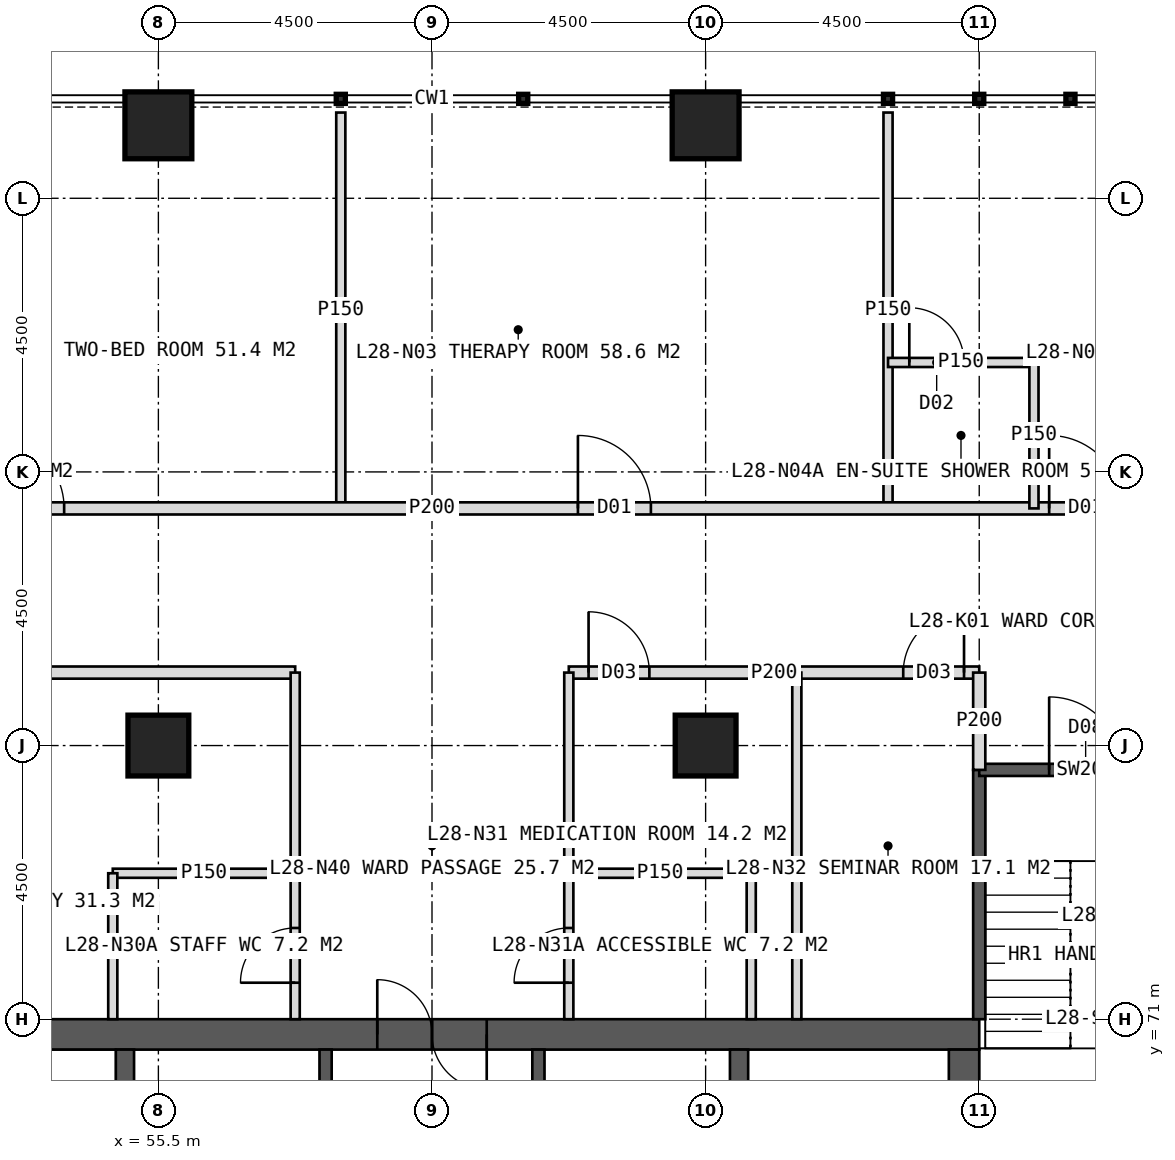
"""IFC4 building model, lengths in metres.
Left out: names, types, materials, properties, quantities, classifications, styles, units other than length and angle.
Written with IfcOpenShell. Run it as: python <this file> out.ifc"""

import sys

from ifc_helpers import new_model, si_unit, direction, frame, frame_2d, origin, origin_2d, place, context, subcontext, project, spatial, rectangle, hollow_rectangle, extrude, element, fill, save


model = new_model("IFC4")
c1 = context("Model", 3, precision=1e-05, world=origin(), true_north=direction((0.0, 1.0)))
c2 = subcontext(c1, "Body", "Model", "MODEL_VIEW")
j1 = project(units=[si_unit("LENGTHUNIT", "METRE"), si_unit("PLANEANGLEUNIT", "RADIAN")], contexts=[c1])
p1 = place(None, origin())
s1 = spatial("IfcSite", under=j1, at=p1, CompositionType="ELEMENT")
p2 = place(p1, origin())
s2 = spatial("IfcBuilding", under=s1, at=p2, CompositionType="ELEMENT")
p3 = place(p2, frame((0.0, 0.0, 120.0)))
s3 = spatial("IfcBuildingStorey", under=s2, at=p3, CompositionType="ELEMENT", Elevation=120.0)
p4 = place(p3, frame((51.0, 70.75, 0.0), z_axis=(0.0, 0.0, 1.0), x_axis=(1.0, 0.0, 0.0)))
e1 = element("IfcWall", 1, at=p4, inside=s3, PredefinedType="SHEAR", context=c2, shape_type="SweptSolid", body=[
    extrude(rectangle(XDim=18.0, YDim=0.5, at=frame_2d((9.0, 0.0))), origin(), (0.0, 0.0, 1.0), 4.0),
])
p5 = place(p4, frame((8.1, 0.0, 0.0)))
e2 = element("IfcOpeningElement", 2, at=p5, cuts=e1, PredefinedType="OPENING", context=c2, shape_type="SweptSolid", body=[
    extrude(rectangle(XDim=1.8, YDim=2.2, at=frame_2d((0.9, 1.1))), frame((0.0, 0.26, 0.0), z_axis=(0.0, -1.0, 0.0), x_axis=(1.0, 0.0, 0.0)), (0.0, 0.0, 1.0), 0.52),
])
p6 = place(p3, frame((68.75, 53.5, 0.0), z_axis=(0.0, 0.0, 1.0), x_axis=(0.0, 1.0, 0.0)))
e3 = element("IfcWall", 3, at=p6, inside=s3, PredefinedType="SHEAR", context=c2, shape_type="SweptSolid", body=[
    extrude(rectangle(XDim=17.0, YDim=0.5, at=frame_2d((8.5, 0.0))), origin(), (0.0, 0.0, 1.0), 4.0),
])
p7 = place(p6, frame((9.5, 0.0, 0.0)))
e4 = element("IfcOpeningElement", 4, at=p7, cuts=e3, PredefinedType="OPENING", context=c2, shape_type="SweptSolid", body=[
    extrude(rectangle(XDim=1.5, YDim=2.2, at=frame_2d((0.75, 1.1))), frame((0.0, 0.26, 0.0), z_axis=(0.0, -1.0, 0.0), x_axis=(1.0, 0.0, 0.0)), (0.0, 0.0, 1.0), 0.52),
])
for number, where, z_axis, x_axis in (
    (5, (54.95, 53.5, 0.0), (0.0, 0.0, 1.0), (0.0, 1.0, 0.0)),
    (6, (65.05, 53.5, 0.0), (0.0, 0.0, 1.0), (0.0, 1.0, 0.0)),
):
    element("IfcWall", number, at=place(p3, frame(where, z_axis=z_axis, x_axis=x_axis)), inside=s3, PredefinedType="SHEAR", context=c2, shape_type="SweptSolid", body=[
        extrude(rectangle(XDim=17.0, YDim=0.3, at=frame_2d((8.5, 0.0))), origin(), (0.0, 0.0, 1.0), 4.0),
    ])
p8 = place(p3, frame((58.25, 53.5, 0.0), z_axis=(0.0, 0.0, 1.0), x_axis=(0.0, 1.0, 0.0)))
e7 = element("IfcWall", 7, at=p8, inside=s3, PredefinedType="SHEAR", context=c2, shape_type="SweptSolid", body=[
    extrude(rectangle(XDim=17.0, YDim=0.2, at=frame_2d((8.5, 0.0))), origin(), (0.0, 0.0, 1.0), 4.0),
])
p9 = place(p8, frame((1.375, 0.0, 0.0)))
e8 = element("IfcOpeningElement", 8, at=p9, cuts=e7, PredefinedType="OPENING", context=c2, shape_type="SweptSolid", body=[
    extrude(rectangle(XDim=1.4, YDim=2.2, at=frame_2d((0.7, 1.1))), frame((0.0, 0.11, 0.0), z_axis=(0.0, -1.0, 0.0), x_axis=(1.0, 0.0, 0.0)), (0.0, 0.0, 1.0), 0.22),
])
p10 = place(p8, frame((5.675, 0.0, 0.0)))
e9 = element("IfcOpeningElement", 9, at=p10, cuts=e7, PredefinedType="OPENING", context=c2, shape_type="SweptSolid", body=[
    extrude(rectangle(XDim=1.4, YDim=2.2, at=frame_2d((0.7, 1.1))), frame((0.0, 0.11, 0.0), z_axis=(0.0, -1.0, 0.0), x_axis=(1.0, 0.0, 0.0)), (0.0, 0.0, 1.0), 0.22),
])
p11 = place(p3, frame((61.75, 53.5, 0.0), z_axis=(0.0, 0.0, 1.0), x_axis=(0.0, 1.0, 0.0)))
e10 = element("IfcWall", 10, at=p11, inside=s3, PredefinedType="SHEAR", context=c2, shape_type="SweptSolid", body=[
    extrude(rectangle(XDim=17.0, YDim=0.2, at=frame_2d((8.5, 0.0))), origin(), (0.0, 0.0, 1.0), 4.0),
])
p12 = place(p11, frame((1.375, 0.0, 0.0)))
e11 = element("IfcOpeningElement", 11, at=p12, cuts=e10, PredefinedType="OPENING", context=c2, shape_type="SweptSolid", body=[
    extrude(rectangle(XDim=1.4, YDim=2.2, at=frame_2d((0.7, 1.1))), frame((0.0, 0.11, 0.0), z_axis=(0.0, -1.0, 0.0), x_axis=(1.0, 0.0, 0.0)), (0.0, 0.0, 1.0), 0.22),
])
p13 = place(p11, frame((5.675, 0.0, 0.0)))
e12 = element("IfcOpeningElement", 12, at=p13, cuts=e10, PredefinedType="OPENING", context=c2, shape_type="SweptSolid", body=[
    extrude(rectangle(XDim=1.4, YDim=2.2, at=frame_2d((0.7, 1.1))), frame((0.0, 0.11, 0.0), z_axis=(0.0, -1.0, 0.0), x_axis=(1.0, 0.0, 0.0)), (0.0, 0.0, 1.0), 0.22),
])
for number, where, z_axis, x_axis in (
    (13, (55.5, 75.5, 0.0), (0.0, 0.0, 1.0), (1.0, 0.0, 0.0)),
    (14, (64.5, 75.5, 0.0), (0.0, 0.0, 1.0), (1.0, 0.0, 0.0)),
):
    element("IfcColumn", number, at=place(p3, frame(where, z_axis=z_axis, x_axis=x_axis)), inside=s3, PredefinedType="COLUMN", context=c2, shape_type="SweptSolid", body=[
        extrude(hollow_rectangle(XDim=1.0, YDim=1.0, WallThickness=0.1, at=origin_2d()), origin(), (0.0, 0.0, 1.0), 4.0),
    ])
for number, where, z_axis, x_axis in (
    (15, (55.5, 85.7, 0.0), (0.0, 0.0, 1.0), (1.0, 0.0, 0.0)),
    (16, (64.5, 85.7, 0.0), (0.0, 0.0, 1.0), (1.0, 0.0, 0.0)),
):
    element("IfcColumn", number, at=place(p3, frame(where, z_axis=z_axis, x_axis=x_axis)), inside=s3, PredefinedType="COLUMN", context=c2, shape_type="SweptSolid", body=[
        extrude(hollow_rectangle(XDim=1.1, YDim=1.1, WallThickness=0.1, at=origin_2d()), origin(), (0.0, 0.0, 1.0), 4.0),
    ])
for number, where, z_axis, x_axis in (
    (17, (58.5, 79.4, 0.0), (0.0, 0.0, 1.0), (0.0, 1.0, 0.0)),
    (18, (67.5, 79.4, 0.0), (0.0, 0.0, 1.0), (0.0, 1.0, 0.0)),
):
    element("IfcWall", number, at=place(p3, frame(where, z_axis=z_axis, x_axis=x_axis)), inside=s3, PredefinedType="PARTITIONING", context=c2, shape_type="SweptSolid", body=[
        extrude(rectangle(XDim=6.51, YDim=0.15, at=frame_2d((3.255, 0.0))), origin(), (0.0, 0.0, 1.0), 3.75),
    ])
p14 = place(p3, frame((42.6, 79.4, 0.0), z_axis=(0.0, 0.0, 1.0), x_axis=(1.0, 0.0, 0.0)))
e19 = element("IfcWall", 19, at=p14, inside=s3, PredefinedType="PARTITIONING", context=c2, shape_type="SweptSolid", body=[
    extrude(rectangle(XDim=34.8, YDim=0.2, at=frame_2d((17.4, 0.0))), origin(), (0.0, 0.0, 1.0), 3.75),
])
p15 = place(p14, frame((2.45, 0.0, 0.0)))
e20 = element("IfcOpeningElement", 20, at=p15, cuts=e19, PredefinedType="OPENING", context=c2, shape_type="SweptSolid", body=[
    extrude(rectangle(XDim=1.2, YDim=2.2, at=frame_2d((0.6, 1.1))), frame((0.0, 0.11, 0.0), z_axis=(0.0, -1.0, 0.0), x_axis=(1.0, 0.0, 0.0)), (0.0, 0.0, 1.0), 0.22),
])
p16 = place(p14, frame((10.15, 0.0, 0.0)))
e21 = element("IfcOpeningElement", 21, at=p16, cuts=e19, PredefinedType="OPENING", context=c2, shape_type="SweptSolid", body=[
    extrude(rectangle(XDim=1.2, YDim=2.2, at=frame_2d((0.6, 1.1))), frame((0.0, 0.11, 0.0), z_axis=(0.0, -1.0, 0.0), x_axis=(1.0, 0.0, 0.0)), (0.0, 0.0, 1.0), 0.22),
])
p17 = place(p14, frame((19.8, 0.0, 0.0)))
e22 = element("IfcOpeningElement", 22, at=p17, cuts=e19, PredefinedType="OPENING", context=c2, shape_type="SweptSolid", body=[
    extrude(rectangle(XDim=1.2, YDim=2.2, at=frame_2d((0.6, 1.1))), frame((0.0, 0.11, 0.0), z_axis=(0.0, -1.0, 0.0), x_axis=(1.0, 0.0, 0.0)), (0.0, 0.0, 1.0), 0.22),
])
p18 = place(p14, frame((27.55, 0.0, 0.0)))
e23 = element("IfcOpeningElement", 23, at=p18, cuts=e19, PredefinedType="OPENING", context=c2, shape_type="SweptSolid", body=[
    extrude(rectangle(XDim=1.2, YDim=2.2, at=frame_2d((0.6, 1.1))), frame((0.0, 0.11, 0.0), z_axis=(0.0, -1.0, 0.0), x_axis=(1.0, 0.0, 0.0)), (0.0, 0.0, 1.0), 0.22),
])
p19 = place(p3, frame((67.5, 81.8, 0.0), z_axis=(0.0, 0.0, 1.0), x_axis=(1.0, 0.0, 0.0)))
e24 = element("IfcWall", 24, at=p19, inside=s3, PredefinedType="PARTITIONING", context=c2, shape_type="SweptSolid", body=[
    extrude(rectangle(XDim=2.4, YDim=0.15, at=frame_2d((1.2, 0.0))), origin(), (0.0, 0.0, 1.0), 3.75),
])
p20 = place(p19, frame((0.35, 0.0, 0.0)))
e25 = element("IfcOpeningElement", 25, at=p20, cuts=e24, PredefinedType="OPENING", context=c2, shape_type="SweptSolid", body=[
    extrude(rectangle(XDim=0.9, YDim=2.1, at=frame_2d((0.45, 1.05))), frame((0.0, 0.085, 0.0), z_axis=(0.0, -1.0, 0.0), x_axis=(1.0, 0.0, 0.0)), (0.0, 0.0, 1.0), 0.17),
])
p21 = place(p3, frame((69.9, 79.4, 0.0), z_axis=(0.0, 0.0, 1.0), x_axis=(0.0, 1.0, 0.0)))
e26 = element("IfcWall", 26, at=p21, inside=s3, PredefinedType="PARTITIONING", context=c2, shape_type="SweptSolid", body=[
    extrude(rectangle(XDim=2.4, YDim=0.15, at=frame_2d((1.2, 0.0))), origin(), (0.0, 0.0, 1.0), 3.75),
])
p22 = place(p3, frame((45.3, 76.7, 0.0), z_axis=(0.0, 0.0, 1.0), x_axis=(1.0, 0.0, 0.0)))
e27 = element("IfcWall", 27, at=p22, inside=s3, PredefinedType="PARTITIONING", context=c2, shape_type="SweptSolid", body=[
    extrude(rectangle(XDim=12.45, YDim=0.2, at=frame_2d((6.225, 0.0))), origin(), (0.0, 0.0, 1.0), 3.75),
])
p23 = place(p22, frame((7.15, 0.0, 0.0)))
e28 = element("IfcOpeningElement", 28, at=p23, cuts=e27, PredefinedType="OPENING", context=c2, shape_type="SweptSolid", body=[
    extrude(rectangle(XDim=1.0, YDim=2.1, at=frame_2d((0.5, 1.05))), frame((0.0, 0.11, 0.0), z_axis=(0.0, -1.0, 0.0), x_axis=(1.0, 0.0, 0.0)), (0.0, 0.0, 1.0), 0.22),
])
p24 = place(p3, frame((62.25, 76.7, 0.0), z_axis=(0.0, 0.0, 1.0), x_axis=(1.0, 0.0, 0.0)))
e29 = element("IfcWall", 29, at=p24, inside=s3, PredefinedType="PARTITIONING", context=c2, shape_type="SweptSolid", body=[
    extrude(rectangle(XDim=6.75, YDim=0.2, at=frame_2d((3.375, 0.0))), origin(), (0.0, 0.0, 1.0), 3.75),
])
p25 = place(p24, frame((0.325, 0.0, 0.0)))
e30 = element("IfcOpeningElement", 30, at=p25, cuts=e29, PredefinedType="OPENING", context=c2, shape_type="SweptSolid", body=[
    extrude(rectangle(XDim=1.0, YDim=2.1, at=frame_2d((0.5, 1.05))), frame((0.0, 0.11, 0.0), z_axis=(0.0, -1.0, 0.0), x_axis=(1.0, 0.0, 0.0)), (0.0, 0.0, 1.0), 0.22),
])
p26 = place(p24, frame((5.5, 0.0, 0.0)))
e31 = element("IfcOpeningElement", 31, at=p26, cuts=e29, PredefinedType="OPENING", context=c2, shape_type="SweptSolid", body=[
    extrude(rectangle(XDim=1.0, YDim=2.1, at=frame_2d((0.5, 1.05))), frame((0.0, 0.11, 0.0), z_axis=(0.0, -1.0, 0.0), x_axis=(1.0, 0.0, 0.0)), (0.0, 0.0, 1.0), 0.22),
])
p27 = place(p3, frame((57.75, 71.0, 0.0), z_axis=(0.0, 0.0, 1.0), x_axis=(0.0, 1.0, 0.0)))
e32 = element("IfcWall", 32, at=p27, inside=s3, PredefinedType="PARTITIONING", context=c2, shape_type="SweptSolid", body=[
    extrude(rectangle(XDim=5.7, YDim=0.15, at=frame_2d((2.85, 0.0))), origin(), (0.0, 0.0, 1.0), 3.75),
])
p28 = place(p27, frame((0.6, 0.0, 0.0)))
e33 = element("IfcOpeningElement", 33, at=p28, cuts=e32, PredefinedType="OPENING", context=c2, shape_type="SweptSolid", body=[
    extrude(rectangle(XDim=0.9, YDim=2.1, at=frame_2d((0.45, 1.05))), frame((0.0, 0.085, 0.0), z_axis=(0.0, -1.0, 0.0), x_axis=(1.0, 0.0, 0.0)), (0.0, 0.0, 1.0), 0.17),
])
p29 = place(p3, frame((62.25, 71.0, 0.0), z_axis=(0.0, 0.0, 1.0), x_axis=(0.0, 1.0, 0.0)))
e34 = element("IfcWall", 34, at=p29, inside=s3, PredefinedType="PARTITIONING", context=c2, shape_type="SweptSolid", body=[
    extrude(rectangle(XDim=5.7, YDim=0.15, at=frame_2d((2.85, 0.0))), origin(), (0.0, 0.0, 1.0), 3.75),
])
p30 = place(p29, frame((0.6, 0.0, 0.0)))
e35 = element("IfcOpeningElement", 35, at=p30, cuts=e34, PredefinedType="OPENING", context=c2, shape_type="SweptSolid", body=[
    extrude(rectangle(XDim=0.9, YDim=2.1, at=frame_2d((0.45, 1.05))), frame((0.0, 0.085, 0.0), z_axis=(0.0, -1.0, 0.0), x_axis=(1.0, 0.0, 0.0)), (0.0, 0.0, 1.0), 0.17),
])
p31 = place(p3, frame((66.0, 71.0, 0.0), z_axis=(0.0, 0.0, 1.0), x_axis=(0.0, 1.0, 0.0)))
e36 = element("IfcWall", 36, at=p31, inside=s3, PredefinedType="PARTITIONING", context=c2, shape_type="SweptSolid", body=[
    extrude(rectangle(XDim=5.7, YDim=0.15, at=frame_2d((2.85, 0.0))), origin(), (0.0, 0.0, 1.0), 3.75),
])
p32 = place(p3, frame((54.75, 73.4, 0.0), z_axis=(0.0, 0.0, 1.0), x_axis=(1.0, 0.0, 0.0)))
e37 = element("IfcWall", 37, at=p32, inside=s3, PredefinedType="PARTITIONING", context=c2, shape_type="SweptSolid", body=[
    extrude(rectangle(XDim=3.0, YDim=0.15, at=frame_2d((1.5, 0.0))), origin(), (0.0, 0.0, 1.0), 3.75),
])
p33 = place(p3, frame((54.75, 71.0, 0.0), z_axis=(0.0, 0.0, 1.0), x_axis=(0.0, 1.0, 0.0)))
e38 = element("IfcWall", 38, at=p33, inside=s3, PredefinedType="PARTITIONING", context=c2, shape_type="SweptSolid", body=[
    extrude(rectangle(XDim=2.4, YDim=0.15, at=frame_2d((1.2, 0.0))), origin(), (0.0, 0.0, 1.0), 3.75),
])
p34 = place(p3, frame((62.25, 73.4, 0.0), z_axis=(0.0, 0.0, 1.0), x_axis=(1.0, 0.0, 0.0)))
e39 = element("IfcWall", 39, at=p34, inside=s3, PredefinedType="PARTITIONING", context=c2, shape_type="SweptSolid", body=[
    extrude(rectangle(XDim=3.0, YDim=0.15, at=frame_2d((1.5, 0.0))), origin(), (0.0, 0.0, 1.0), 3.75),
])
p35 = place(p3, frame((65.25, 71.0, 0.0), z_axis=(0.0, 0.0, 1.0), x_axis=(0.0, 1.0, 0.0)))
e40 = element("IfcWall", 40, at=p35, inside=s3, PredefinedType="PARTITIONING", context=c2, shape_type="SweptSolid", body=[
    extrude(rectangle(XDim=2.4, YDim=0.15, at=frame_2d((1.2, 0.0))), origin(), (0.0, 0.0, 1.0), 3.75),
])
p36 = place(p3, frame((69.0, 71.0, 0.0), z_axis=(0.0, 0.0, 1.0), x_axis=(0.0, 1.0, 0.0)))
e41 = element("IfcWall", 41, at=p36, inside=s3, PredefinedType="SOLIDWALL", context=c2, shape_type="SweptSolid", body=[
    extrude(rectangle(XDim=4.1, YDim=0.2, at=frame_2d((2.05, 0.0))), origin(), (0.0, 0.0, 1.0), 3.75),
])
p37 = place(p3, frame((69.0, 75.1, 0.0), z_axis=(0.0, 0.0, 1.0), x_axis=(1.0, 0.0, 0.0)))
e42 = element("IfcWall", 42, at=p37, inside=s3, PredefinedType="SOLIDWALL", context=c2, shape_type="SweptSolid", body=[
    extrude(rectangle(XDim=3.5, YDim=0.2, at=frame_2d((1.75, 0.0))), origin(), (0.0, 0.0, 1.0), 3.75),
])
p38 = place(p37, frame((1.15, 0.0, 0.0)))
e43 = element("IfcOpeningElement", 43, at=p38, cuts=e42, PredefinedType="OPENING", context=c2, shape_type="SweptSolid", body=[
    extrude(rectangle(XDim=1.2, YDim=2.1, at=frame_2d((0.6, 1.05))), frame((0.0, 0.11, 0.0), z_axis=(0.0, -1.0, 0.0), x_axis=(1.0, 0.0, 0.0)), (0.0, 0.0, 1.0), 0.22),
])
p39 = place(p3, frame((69.0, 75.1, 0.0), z_axis=(0.0, 0.0, 1.0), x_axis=(0.0, 1.0, 0.0)))
e44 = element("IfcWall", 44, at=p39, inside=s3, PredefinedType="PARTITIONING", context=c2, shape_type="SweptSolid", body=[
    extrude(rectangle(XDim=1.6, YDim=0.2, at=frame_2d((0.8, 0.0))), origin(), (0.0, 0.0, 1.0), 3.75),
])
p40 = place(p16, origin())
e45 = element("IfcDoor", 45, at=p40, inside=s3, OperationType="SINGLE_SWING_LEFT", PredefinedType="DOOR", context=c2, shape_type="SweptSolid", body=[
    extrude(rectangle(XDim=1.2, YDim=2.2, at=frame_2d((0.6, 1.1))), frame((0.0, 0.025, 0.0), z_axis=(0.0, -1.0, 0.0), x_axis=(1.0, 0.0, 0.0)), (0.0, 0.0, 1.0), 0.05),
])
fill(e21, e45)
p41 = place(p17, origin())
e46 = element("IfcDoor", 46, at=p41, inside=s3, OperationType="SINGLE_SWING_LEFT", PredefinedType="DOOR", context=c2, shape_type="SweptSolid", body=[
    extrude(rectangle(XDim=1.2, YDim=2.2, at=frame_2d((0.6, 1.1))), frame((0.0, 0.025, 0.0), z_axis=(0.0, -1.0, 0.0), x_axis=(1.0, 0.0, 0.0)), (0.0, 0.0, 1.0), 0.05),
])
fill(e22, e46)
p42 = place(p18, origin())
e47 = element("IfcDoor", 47, at=p42, inside=s3, OperationType="SINGLE_SWING_LEFT", PredefinedType="DOOR", context=c2, shape_type="SweptSolid", body=[
    extrude(rectangle(XDim=1.2, YDim=2.2, at=frame_2d((0.6, 1.1))), frame((0.0, 0.025, 0.0), z_axis=(0.0, -1.0, 0.0), x_axis=(1.0, 0.0, 0.0)), (0.0, 0.0, 1.0), 0.05),
])
fill(e23, e47)
p43 = place(p20, origin())
e48 = element("IfcDoor", 48, at=p43, inside=s3, OperationType="SINGLE_SWING_LEFT", PredefinedType="DOOR", context=c2, shape_type="SweptSolid", body=[
    extrude(rectangle(XDim=0.9, YDim=2.1, at=frame_2d((0.45, 1.05))), frame((0.0, 0.025, 0.0), z_axis=(0.0, -1.0, 0.0), x_axis=(1.0, 0.0, 0.0)), (0.0, 0.0, 1.0), 0.05),
])
fill(e25, e48)
p44 = place(p28, origin())
e49 = element("IfcDoor", 49, at=p44, inside=s3, OperationType="SINGLE_SWING_LEFT", PredefinedType="DOOR", context=c2, shape_type="SweptSolid", body=[
    extrude(rectangle(XDim=0.9, YDim=2.1, at=frame_2d((0.45, 1.05))), frame((0.0, 0.025, 0.0), z_axis=(0.0, -1.0, 0.0), x_axis=(1.0, 0.0, 0.0)), (0.0, 0.0, 1.0), 0.05),
])
fill(e33, e49)
p45 = place(p30, origin())
e50 = element("IfcDoor", 50, at=p45, inside=s3, OperationType="SINGLE_SWING_LEFT", PredefinedType="DOOR", context=c2, shape_type="SweptSolid", body=[
    extrude(rectangle(XDim=0.9, YDim=2.1, at=frame_2d((0.45, 1.05))), frame((0.0, 0.025, 0.0), z_axis=(0.0, -1.0, 0.0), x_axis=(1.0, 0.0, 0.0)), (0.0, 0.0, 1.0), 0.05),
])
fill(e35, e50)
p46 = place(p25, origin())
e51 = element("IfcDoor", 51, at=p46, inside=s3, OperationType="SINGLE_SWING_LEFT", PredefinedType="DOOR", context=c2, shape_type="SweptSolid", body=[
    extrude(rectangle(XDim=1.0, YDim=2.1, at=frame_2d((0.5, 1.05))), frame((0.0, 0.025, 0.0), z_axis=(0.0, -1.0, 0.0), x_axis=(1.0, 0.0, 0.0)), (0.0, 0.0, 1.0), 0.05),
])
fill(e30, e51)
p47 = place(p26, origin())
e52 = element("IfcDoor", 52, at=p47, inside=s3, OperationType="SINGLE_SWING_RIGHT", PredefinedType="DOOR", context=c2, shape_type="SweptSolid", body=[
    extrude(rectangle(XDim=1.0, YDim=2.1, at=frame_2d((0.5, 1.05))), frame((0.0, 0.025, 0.0), z_axis=(0.0, -1.0, 0.0), x_axis=(1.0, 0.0, 0.0)), (0.0, 0.0, 1.0), 0.05),
])
fill(e31, e52)
p48 = place(p5, origin())
e53 = element("IfcDoor", 53, at=p48, inside=s3, OperationType="DOUBLE_DOOR_SINGLE_SWING", PredefinedType="DOOR", context=c2, shape_type="SweptSolid", body=[
    extrude(rectangle(XDim=1.8, YDim=2.2, at=frame_2d((0.9, 1.1))), frame((0.0, 0.025, 0.0), z_axis=(0.0, -1.0, 0.0), x_axis=(1.0, 0.0, 0.0)), (0.0, 0.0, 1.0), 0.05),
])
fill(e2, e53)
p49 = place(p38, origin())
e54 = element("IfcDoor", 54, at=p49, inside=s3, OperationType="SINGLE_SWING_LEFT", PredefinedType="DOOR", context=c2, shape_type="SweptSolid", body=[
    extrude(rectangle(XDim=1.2, YDim=2.1, at=frame_2d((0.6, 1.05))), frame((0.0, 0.025, 0.0), z_axis=(0.0, -1.0, 0.0), x_axis=(1.0, 0.0, 0.0)), (0.0, 0.0, 1.0), 0.05),
])
fill(e43, e54)
save(model, sys.argv[1])
